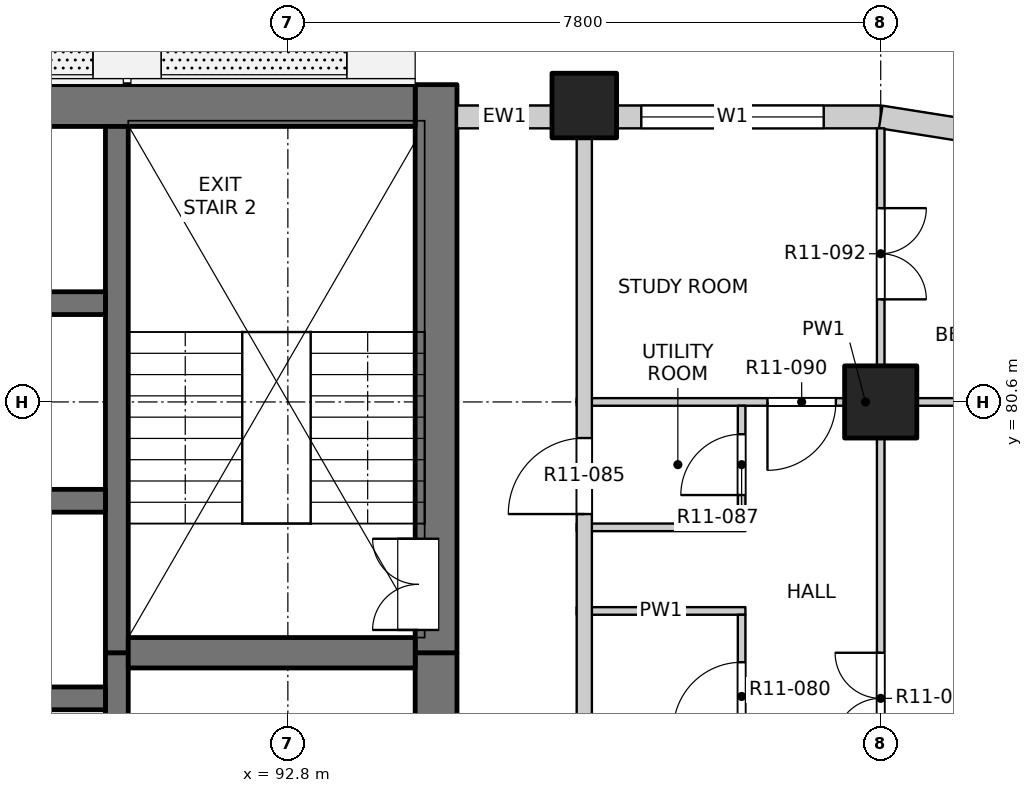
"""IFC4 building model, lengths in metres.
Left out: names, types, materials, properties, quantities, classifications, styles, units other than length and angle.
Written with IfcOpenShell. Run it as: python <this file> out.ifc"""

import sys

from ifc_helpers import new_model, si_unit, direction, frame, frame_2d, origin, origin_2d, place, context, subcontext, project, spatial, rectangle, extrude, element, fill, save


model = new_model("IFC4")
c1 = context("Model", 3, precision=1e-05, world=origin(), true_north=direction((0.0, 1.0)))
c2 = subcontext(c1, "Body", "Model", "MODEL_VIEW")
j1 = project(units=[si_unit("LENGTHUNIT", "METRE"), si_unit("PLANEANGLEUNIT", "RADIAN")], contexts=[c1])
p1 = place(None, origin())
s1 = spatial("IfcSite", under=j1, at=p1, CompositionType="ELEMENT")
p2 = place(p1, origin())
s2 = spatial("IfcBuilding", under=s1, at=p2, CompositionType="ELEMENT")
p3 = place(p2, frame((0.0, 0.0, 130.5)))
s3 = spatial("IfcBuildingStorey", under=s2, at=p3, CompositionType="ELEMENT", Elevation=130.5)
p4 = place(p3, frame((96.7, 84.5, -0.25), z_axis=(0.0, 0.0, 1.0), x_axis=(1.0, 0.0, 0.0)))
e1 = element("IfcColumn", 1, at=p4, inside=s3, PredefinedType="COLUMN", context=c2, shape_type="SweptSolid", body=[
    extrude(rectangle(XDim=0.85, YDim=0.85, at=origin_2d()), origin(), (0.0, 0.0, 1.0), 3.4),
])
p5 = place(p3, frame((100.6, 80.6, -0.25), z_axis=(0.0, 0.0, 1.0), x_axis=(1.0, 0.0, 0.0)))
e2 = element("IfcColumn", 2, at=p5, inside=s3, PredefinedType="COLUMN", context=c2, shape_type="SweptSolid", body=[
    extrude(rectangle(XDim=0.95, YDim=0.95, at=origin_2d()), origin(), (0.0, 0.0, 1.0), 3.4),
])
p6 = place(p3, frame((94.75, 61.95, -0.25), z_axis=(0.0, 0.0, 1.0), x_axis=(0.0, 1.0, 0.0)))
e3 = element("IfcWall", 3, at=p6, inside=s3, PredefinedType="SOLIDWALL", context=c2, shape_type="SweptSolid", body=[
    extrude(rectangle(XDim=15.35, YDim=0.55, at=frame_2d((7.675, 0.0))), origin(), (0.0, 0.0, 1.0), 3.4),
])
p7 = place(p6, frame((0.925, 0.0, 0.25)))
e4 = element("IfcOpeningElement", 4, at=p7, cuts=e3, PredefinedType="OPENING", context=c2, shape_type="SweptSolid", body=[
    extrude(rectangle(XDim=0.9, YDim=2.1, at=frame_2d((0.45, 1.05))), frame((0.0, 0.285, 0.0), z_axis=(0.0, -1.0, 0.0), x_axis=(1.0, 0.0, 0.0)), (0.0, 0.0, 1.0), 0.57),
])
p8 = place(p6, frame((3.8, 0.0, 0.25)))
e5 = element("IfcOpeningElement", 5, at=p8, cuts=e3, PredefinedType="OPENING", context=c2, shape_type="SweptSolid", body=[
    extrude(rectangle(XDim=0.9, YDim=2.1, at=frame_2d((0.45, 1.05))), frame((0.0, 0.285, 0.0), z_axis=(0.0, -1.0, 0.0), x_axis=(1.0, 0.0, 0.0)), (0.0, 0.0, 1.0), 0.57),
])
p9 = place(p6, frame((6.8, 0.0, 0.25)))
e6 = element("IfcOpeningElement", 6, at=p9, cuts=e3, PredefinedType="OPENING", context=c2, shape_type="SweptSolid", body=[
    extrude(rectangle(XDim=0.9, YDim=2.1, at=frame_2d((0.45, 1.05))), frame((0.0, 0.285, 0.0), z_axis=(0.0, -1.0, 0.0), x_axis=(1.0, 0.0, 0.0)), (0.0, 0.0, 1.0), 0.57),
])
p10 = place(p6, frame((9.8, 0.0, 0.25)))
e7 = element("IfcOpeningElement", 7, at=p10, cuts=e3, PredefinedType="OPENING", context=c2, shape_type="SweptSolid", body=[
    extrude(rectangle(XDim=0.9, YDim=2.1, at=frame_2d((0.45, 1.05))), frame((0.0, 0.285, 0.0), z_axis=(0.0, -1.0, 0.0), x_axis=(1.0, 0.0, 0.0)), (0.0, 0.0, 1.0), 0.57),
])
p11 = place(p6, frame((13.1, 0.0, 0.25)))
e8 = element("IfcOpeningElement", 8, at=p11, cuts=e3, PredefinedType="OPENING", context=c2, shape_type="SweptSolid", body=[
    extrude(rectangle(XDim=0.9, YDim=2.1, at=frame_2d((0.45, 1.05))), frame((0.0, 0.285, 0.0), z_axis=(0.0, -1.0, 0.0), x_axis=(1.0, 0.0, 0.0)), (0.0, 0.0, 1.0), 0.57),
])
p12 = place(p3, frame((94.75, 77.3, -0.25), z_axis=(0.0, 0.0, 1.0), x_axis=(0.0, 1.0, 0.0)))
e9 = element("IfcWall", 9, at=p12, inside=s3, PredefinedType="SOLIDWALL", context=c2, shape_type="SweptSolid", body=[
    extrude(rectangle(XDim=7.475, YDim=0.55, at=frame_2d((3.737, 0.0))), origin(), (0.0, 0.0, 1.0), 3.4),
])
p13 = place(p12, frame((0.3, 0.0, 0.25)))
e10 = element("IfcOpeningElement", 10, at=p13, cuts=e9, PredefinedType="OPENING", context=c2, shape_type="SweptSolid", body=[
    extrude(rectangle(XDim=1.2, YDim=2.1, at=frame_2d((0.6, 1.05))), frame((0.0, 0.285, 0.0), z_axis=(0.0, -1.0, 0.0), x_axis=(1.0, 0.0, 0.0)), (0.0, 0.0, 1.0), 0.57),
])
p14 = place(p3, frame((75.525, 84.5, -0.25), z_axis=(0.0, 0.0, 1.0), x_axis=(1.0, 0.0, 0.0)))
e11 = element("IfcWall", 11, at=p14, inside=s3, PredefinedType="SOLIDWALL", context=c2, shape_type="SweptSolid", body=[
    extrude(rectangle(XDim=18.95, YDim=0.55, at=frame_2d((9.475, 0.0))), origin(), (0.0, 0.0, 1.0), 3.4),
])
p15 = place(p3, frame((90.55, 61.95, -0.25), z_axis=(0.0, 0.0, 1.0), x_axis=(0.0, 1.0, 0.0)))
e12 = element("IfcWall", 12, at=p15, inside=s3, PredefinedType="SOLIDWALL", context=c2, shape_type="SweptSolid", body=[
    extrude(rectangle(XDim=15.35, YDim=0.3, at=frame_2d((7.675, 0.0))), origin(), (0.0, 0.0, 1.0), 3.4),
])
p16 = place(p3, frame((90.55, 77.3, -0.25), z_axis=(0.0, 0.0, 1.0), x_axis=(0.0, 1.0, 0.0)))
e13 = element("IfcWall", 13, at=p16, inside=s3, PredefinedType="SOLIDWALL", context=c2, shape_type="SweptSolid", body=[
    extrude(rectangle(XDim=6.925, YDim=0.3, at=frame_2d((3.462, 0.0))), origin(), (0.0, 0.0, 1.0), 3.4),
])
for number, where, z_axis, x_axis in (
    (14, (87.4, 76.7, -0.25), (0.0, 0.0, 1.0), (1.0, 0.0, 0.0)),
    (15, (87.4, 79.3, -0.25), (0.0, 0.0, 1.0), (1.0, 0.0, 0.0)),
    (16, (87.4, 81.9, -0.25), (0.0, 0.0, 1.0), (1.0, 0.0, 0.0)),
):
    element("IfcWall", number, at=place(p3, frame(where, z_axis=z_axis, x_axis=x_axis)), inside=s3, PredefinedType="SOLIDWALL", context=c2, shape_type="SweptSolid", body=[
        extrude(rectangle(XDim=3.0, YDim=0.3, at=frame_2d((1.5, 0.0))), origin(), (0.0, 0.0, 1.0), 3.4),
    ])
p17 = place(p3, frame((90.7, 77.3, -0.25), z_axis=(0.0, 0.0, 1.0), x_axis=(1.0, 0.0, 0.0)))
e17 = element("IfcWall", 17, at=p17, inside=s3, PredefinedType="SOLIDWALL", context=c2, shape_type="SweptSolid", body=[
    extrude(rectangle(XDim=3.775, YDim=0.4, at=frame_2d((1.888, 0.0))), origin(), (0.0, 0.0, 1.0), 3.4),
])
p18 = place(p3, frame((95.025, 84.35, 0.0), z_axis=(0.0, 0.0, 1.0), x_axis=(1.0, 0.0, 0.0)))
e18 = element("IfcWall", 18, at=p18, inside=s3, PredefinedType="SOLIDWALL", context=c2, shape_type="SweptSolid", body=[
    extrude(rectangle(XDim=1.25, YDim=0.3, at=frame_2d((0.625, 0.0))), origin(), (0.0, 0.0, 1.0), 2.7),
])
p19 = place(p3, frame((97.125, 84.35, 0.0), z_axis=(0.0, 0.0, 1.0), x_axis=(1.0, 0.0, 0.0)))
e19 = element("IfcWall", 19, at=p19, inside=s3, PredefinedType="SOLIDWALL", context=c2, shape_type="SweptSolid", body=[
    extrude(rectangle(XDim=3.475, YDim=0.3, at=frame_2d((1.738, 0.0))), origin(), (0.0, 0.0, 1.0), 2.7),
])
p20 = place(p19, frame((0.325, 0.0, 0.9)))
e20 = element("IfcOpeningElement", 20, at=p20, cuts=e19, PredefinedType="OPENING", context=c2, shape_type="SweptSolid", body=[
    extrude(rectangle(XDim=2.4, YDim=1.8, at=frame_2d((1.2, 0.9))), frame((0.0, 0.16, 0.0), z_axis=(0.0, -1.0, 0.0), x_axis=(1.0, 0.0, 0.0)), (0.0, 0.0, 1.0), 0.32),
])
p21 = place(p3, frame((101.759, 84.167, 0.0), z_axis=(0.0, 0.0, 1.0), x_axis=(-0.987678452879, 0.156496880861, 0.0)))
e21 = element("IfcWall", 21, at=p21, inside=s3, PredefinedType="SOLIDWALL", context=c2, shape_type="SweptSolid", body=[
    extrude(rectangle(XDim=1.173, YDim=0.3, at=frame_2d((0.586, 0.0))), origin(), (0.0, 0.0, 1.0), 2.7),
])
for number, where, z_axis, x_axis in (
    (22, (96.6, 77.85, 0.0), (0.0, 0.0, 1.0), (1.0, 0.0, 0.0)),
    (23, (96.6, 78.95, 0.0), (0.0, 0.0, 1.0), (1.0, 0.0, 0.0)),
):
    element("IfcWall", number, at=place(p3, frame(where, z_axis=z_axis, x_axis=x_axis)), inside=s3, PredefinedType="PARTITIONING", context=c2, shape_type="SweptSolid", body=[
        extrude(rectangle(XDim=2.22, YDim=0.1, at=frame_2d((1.11, 0.0))), origin(), (0.0, 0.0, 1.0), 3.15),
    ])
p22 = place(p3, frame((96.6, 80.6, 0.0), z_axis=(0.0, 0.0, 1.0), x_axis=(1.0, 0.0, 0.0)))
e24 = element("IfcWall", 24, at=p22, inside=s3, PredefinedType="PARTITIONING", context=c2, shape_type="SweptSolid", body=[
    extrude(rectangle(XDim=7.6, YDim=0.1, at=frame_2d((3.8, 0.0))), origin(), (0.0, 0.0, 1.0), 3.15),
])
p23 = place(p22, frame((2.51, 0.0, 0.0)))
e25 = element("IfcOpeningElement", 25, at=p23, cuts=e24, PredefinedType="OPENING", context=c2, shape_type="SweptSolid", body=[
    extrude(rectangle(XDim=0.9, YDim=2.1, at=frame_2d((0.45, 1.05))), frame((0.0, 0.06, 0.0), z_axis=(0.0, -1.0, 0.0), x_axis=(1.0, 0.0, 0.0)), (0.0, 0.0, 1.0), 0.12),
])
p24 = place(p3, frame((96.7, 53.4, 0.0), z_axis=(0.0, 0.0, 1.0), x_axis=(0.0, 1.0, 0.0)))
e26 = element("IfcWall", 26, at=p24, inside=s3, PredefinedType="PARTITIONING", context=c2, shape_type="SweptSolid", body=[
    extrude(rectangle(XDim=30.8, YDim=0.2, at=frame_2d((15.4, 0.0))), origin(), (0.0, 0.0, 1.0), 3.15),
])
p25 = place(p24, frame((1.875, 0.0, 0.0)))
e27 = element("IfcOpeningElement", 27, at=p25, cuts=e26, PredefinedType="OPENING", context=c2, shape_type="SweptSolid", body=[
    extrude(rectangle(XDim=1.0, YDim=2.1, at=frame_2d((0.5, 1.05))), frame((0.0, 0.11, 0.0), z_axis=(0.0, -1.0, 0.0), x_axis=(1.0, 0.0, 0.0)), (0.0, 0.0, 1.0), 0.22),
])
p26 = place(p24, frame((10.875, 0.0, 0.0)))
e28 = element("IfcOpeningElement", 28, at=p26, cuts=e26, PredefinedType="OPENING", context=c2, shape_type="SweptSolid", body=[
    extrude(rectangle(XDim=1.0, YDim=2.1, at=frame_2d((0.5, 1.05))), frame((0.0, 0.11, 0.0), z_axis=(0.0, -1.0, 0.0), x_axis=(1.0, 0.0, 0.0)), (0.0, 0.0, 1.0), 0.22),
])
p27 = place(p24, frame((25.725, 0.0, 0.0)))
e29 = element("IfcOpeningElement", 29, at=p27, cuts=e26, PredefinedType="OPENING", context=c2, shape_type="SweptSolid", body=[
    extrude(rectangle(XDim=1.0, YDim=2.1, at=frame_2d((0.5, 1.05))), frame((0.0, 0.11, 0.0), z_axis=(0.0, -1.0, 0.0), x_axis=(1.0, 0.0, 0.0)), (0.0, 0.0, 1.0), 0.22),
])
p28 = place(p3, frame((98.77, 64.15, 0.0), z_axis=(0.0, 0.0, 1.0), x_axis=(0.0, 1.0, 0.0)))
e30 = element("IfcWall", 30, at=p28, inside=s3, PredefinedType="PARTITIONING", context=c2, shape_type="SweptSolid", body=[
    extrude(rectangle(XDim=13.65, YDim=0.1, at=frame_2d((6.825, 0.0))), origin(), (0.0, 0.0, 1.0), 3.15),
])
p29 = place(p28, frame((0.75, 0.0, 0.0)))
e31 = element("IfcOpeningElement", 31, at=p29, cuts=e30, PredefinedType="OPENING", context=c2, shape_type="SweptSolid", body=[
    extrude(rectangle(XDim=0.8, YDim=2.1, at=frame_2d((0.4, 1.05))), frame((0.0, 0.06, 0.0), z_axis=(0.0, -1.0, 0.0), x_axis=(1.0, 0.0, 0.0)), (0.0, 0.0, 1.0), 0.12),
])
p30 = place(p28, frame((3.1, 0.0, 0.0)))
e32 = element("IfcOpeningElement", 32, at=p30, cuts=e30, PredefinedType="OPENING", context=c2, shape_type="SweptSolid", body=[
    extrude(rectangle(XDim=0.9, YDim=2.1, at=frame_2d((0.45, 1.05))), frame((0.0, 0.06, 0.0), z_axis=(0.0, -1.0, 0.0), x_axis=(1.0, 0.0, 0.0)), (0.0, 0.0, 1.0), 0.12),
])
p31 = place(p28, frame((5.61, 0.0, 0.0)))
e33 = element("IfcOpeningElement", 33, at=p31, cuts=e30, PredefinedType="OPENING", context=c2, shape_type="SweptSolid", body=[
    extrude(rectangle(XDim=0.9, YDim=2.1, at=frame_2d((0.45, 1.05))), frame((0.0, 0.06, 0.0), z_axis=(0.0, -1.0, 0.0), x_axis=(1.0, 0.0, 0.0)), (0.0, 0.0, 1.0), 0.12),
])
p32 = place(p28, frame((8.045, 0.0, 0.0)))
e34 = element("IfcOpeningElement", 34, at=p32, cuts=e30, PredefinedType="OPENING", context=c2, shape_type="SweptSolid", body=[
    extrude(rectangle(XDim=0.8, YDim=2.1, at=frame_2d((0.4, 1.05))), frame((0.0, 0.06, 0.0), z_axis=(0.0, -1.0, 0.0), x_axis=(1.0, 0.0, 0.0)), (0.0, 0.0, 1.0), 0.12),
])
p33 = place(p28, frame((10.035, 0.0, 0.0)))
e35 = element("IfcOpeningElement", 35, at=p33, cuts=e30, PredefinedType="OPENING", context=c2, shape_type="SweptSolid", body=[
    extrude(rectangle(XDim=0.9, YDim=2.1, at=frame_2d((0.45, 1.05))), frame((0.0, 0.06, 0.0), z_axis=(0.0, -1.0, 0.0), x_axis=(1.0, 0.0, 0.0)), (0.0, 0.0, 1.0), 0.12),
])
p34 = place(p28, frame((12.125, 0.0, 0.0)))
e36 = element("IfcOpeningElement", 36, at=p34, cuts=e30, PredefinedType="OPENING", context=c2, shape_type="SweptSolid", body=[
    extrude(rectangle(XDim=0.9, YDim=2.1, at=frame_2d((0.45, 1.05))), frame((0.0, 0.06, 0.0), z_axis=(0.0, -1.0, 0.0), x_axis=(1.0, 0.0, 0.0)), (0.0, 0.0, 1.0), 0.12),
])
p35 = place(p3, frame((98.77, 79.0, 0.0), z_axis=(0.0, 0.0, 1.0), x_axis=(0.0, 1.0, 0.0)))
e37 = element("IfcWall", 37, at=p35, inside=s3, PredefinedType="PARTITIONING", context=c2, shape_type="SweptSolid", body=[
    extrude(rectangle(XDim=1.55, YDim=0.1, at=frame_2d((0.775, 0.0))), origin(), (0.0, 0.0, 1.0), 3.15),
])
p36 = place(p35, frame((0.375, 0.0, 0.0)))
e38 = element("IfcOpeningElement", 38, at=p36, cuts=e37, PredefinedType="OPENING", context=c2, shape_type="SweptSolid", body=[
    extrude(rectangle(XDim=0.8, YDim=2.1, at=frame_2d((0.4, 1.05))), frame((0.0, 0.06, 0.0), z_axis=(0.0, -1.0, 0.0), x_axis=(1.0, 0.0, 0.0)), (0.0, 0.0, 1.0), 0.12),
])
p37 = place(p3, frame((100.6, 45.8, 0.0), z_axis=(0.0, 0.0, 1.0), x_axis=(0.0, 1.0, 0.0)))
e39 = element("IfcWall", 39, at=p37, inside=s3, PredefinedType="PARTITIONING", context=c2, shape_type="SweptSolid", body=[
    extrude(rectangle(XDim=38.4, YDim=0.1, at=frame_2d((19.2, 0.0))), origin(), (0.0, 0.0, 1.0), 3.15),
])
p38 = place(p37, frame((1.05, 0.0, 0.0)))
e40 = element("IfcOpeningElement", 40, at=p38, cuts=e39, PredefinedType="OPENING", context=c2, shape_type="SweptSolid", body=[
    extrude(rectangle(XDim=1.2, YDim=2.1, at=frame_2d((0.6, 1.05))), frame((0.0, 0.06, 0.0), z_axis=(0.0, -1.0, 0.0), x_axis=(1.0, 0.0, 0.0)), (0.0, 0.0, 1.0), 0.12),
])
p39 = place(p37, frame((5.1, 0.0, 0.0)))
e41 = element("IfcOpeningElement", 41, at=p39, cuts=e39, PredefinedType="OPENING", context=c2, shape_type="SweptSolid", body=[
    extrude(rectangle(XDim=0.9, YDim=2.1, at=frame_2d((0.45, 1.05))), frame((0.0, 0.06, 0.0), z_axis=(0.0, -1.0, 0.0), x_axis=(1.0, 0.0, 0.0)), (0.0, 0.0, 1.0), 0.12),
])
p40 = place(p37, frame((9.0, 0.0, 0.0)))
e42 = element("IfcOpeningElement", 42, at=p40, cuts=e39, PredefinedType="OPENING", context=c2, shape_type="SweptSolid", body=[
    extrude(rectangle(XDim=0.9, YDim=2.1, at=frame_2d((0.45, 1.05))), frame((0.0, 0.06, 0.0), z_axis=(0.0, -1.0, 0.0), x_axis=(1.0, 0.0, 0.0)), (0.0, 0.0, 1.0), 0.12),
])
p41 = place(p37, frame((12.9, 0.0, 0.0)))
e43 = element("IfcOpeningElement", 43, at=p41, cuts=e39, PredefinedType="OPENING", context=c2, shape_type="SweptSolid", body=[
    extrude(rectangle(XDim=0.9, YDim=2.1, at=frame_2d((0.45, 1.05))), frame((0.0, 0.06, 0.0), z_axis=(0.0, -1.0, 0.0), x_axis=(1.0, 0.0, 0.0)), (0.0, 0.0, 1.0), 0.12),
])
p42 = place(p37, frame((16.8, 0.0, 0.0)))
e44 = element("IfcOpeningElement", 44, at=p42, cuts=e39, PredefinedType="OPENING", context=c2, shape_type="SweptSolid", body=[
    extrude(rectangle(XDim=0.9, YDim=2.1, at=frame_2d((0.45, 1.05))), frame((0.0, 0.06, 0.0), z_axis=(0.0, -1.0, 0.0), x_axis=(1.0, 0.0, 0.0)), (0.0, 0.0, 1.0), 0.12),
])
p43 = place(p37, frame((20.7, 0.0, 0.0)))
e45 = element("IfcOpeningElement", 45, at=p43, cuts=e39, PredefinedType="OPENING", context=c2, shape_type="SweptSolid", body=[
    extrude(rectangle(XDim=0.9, YDim=2.1, at=frame_2d((0.45, 1.05))), frame((0.0, 0.06, 0.0), z_axis=(0.0, -1.0, 0.0), x_axis=(1.0, 0.0, 0.0)), (0.0, 0.0, 1.0), 0.12),
])
p44 = place(p37, frame((24.6, 0.0, 0.0)))
e46 = element("IfcOpeningElement", 46, at=p44, cuts=e39, PredefinedType="OPENING", context=c2, shape_type="SweptSolid", body=[
    extrude(rectangle(XDim=0.9, YDim=2.1, at=frame_2d((0.45, 1.05))), frame((0.0, 0.06, 0.0), z_axis=(0.0, -1.0, 0.0), x_axis=(1.0, 0.0, 0.0)), (0.0, 0.0, 1.0), 0.12),
])
p45 = place(p37, frame((30.3, 0.0, 0.0)))
e47 = element("IfcOpeningElement", 47, at=p45, cuts=e39, PredefinedType="OPENING", context=c2, shape_type="SweptSolid", body=[
    extrude(rectangle(XDim=1.2, YDim=2.1, at=frame_2d((0.6, 1.05))), frame((0.0, 0.06, 0.0), z_axis=(0.0, -1.0, 0.0), x_axis=(1.0, 0.0, 0.0)), (0.0, 0.0, 1.0), 0.12),
])
p46 = place(p37, frame((36.15, 0.0, 0.0)))
e48 = element("IfcOpeningElement", 48, at=p46, cuts=e39, PredefinedType="OPENING", context=c2, shape_type="SweptSolid", body=[
    extrude(rectangle(XDim=1.2, YDim=2.1, at=frame_2d((0.6, 1.05))), frame((0.0, 0.06, 0.0), z_axis=(0.0, -1.0, 0.0), x_axis=(1.0, 0.0, 0.0)), (0.0, 0.0, 1.0), 0.12),
])
p47 = place(p20, origin())
e49 = element("IfcWindow", 49, at=p47, inside=s3, PartitioningType="DOUBLE_PANEL_VERTICAL", PredefinedType="WINDOW", context=c2, shape_type="SweptSolid", body=[
    extrude(rectangle(XDim=2.4, YDim=1.8, at=frame_2d((1.2, 0.9))), frame((0.0, 0.03, 0.0), z_axis=(0.0, -1.0, 0.0), x_axis=(1.0, 0.0, 0.0)), (0.0, 0.0, 1.0), 0.06),
])
fill(e20, e49)
p48 = place(p45, origin())
e50 = element("IfcDoor", 50, at=p48, inside=s3, OperationType="DOUBLE_DOOR_SINGLE_SWING", PredefinedType="DOOR", context=c2, shape_type="SweptSolid", body=[
    extrude(rectangle(XDim=1.2, YDim=2.1, at=frame_2d((0.6, 1.05))), frame((0.0, 0.025, 0.0), z_axis=(0.0, -1.0, 0.0), x_axis=(1.0, 0.0, 0.0)), (0.0, 0.0, 1.0), 0.05),
])
fill(e47, e50)
p49 = place(p34, origin())
e51 = element("IfcDoor", 51, at=p49, inside=s3, OperationType="SINGLE_SWING_LEFT", PredefinedType="DOOR", context=c2, shape_type="SweptSolid", body=[
    extrude(rectangle(XDim=0.9, YDim=2.1, at=frame_2d((0.45, 1.05))), frame((0.0, 0.025, 0.0), z_axis=(0.0, -1.0, 0.0), x_axis=(1.0, 0.0, 0.0)), (0.0, 0.0, 1.0), 0.05),
])
fill(e36, e51)
p50 = place(p13, origin())
e52 = element("IfcDoor", 52, at=p50, inside=s3, OperationType="DOUBLE_DOOR_SINGLE_SWING", PredefinedType="DOOR", context=c2, shape_type="SweptSolid", body=[
    extrude(rectangle(XDim=1.2, YDim=2.1, at=frame_2d((0.6, 1.05))), frame((0.0, 0.26, 0.0), z_axis=(0.0, -1.0, 0.0), x_axis=(1.0, 0.0, 0.0)), (0.0, 0.0, 1.0), 0.05),
])
fill(e10, e52)
p51 = place(p27, origin())
e53 = element("IfcDoor", 53, at=p51, inside=s3, OperationType="SINGLE_SWING_LEFT", PredefinedType="DOOR", context=c2, shape_type="SweptSolid", body=[
    extrude(rectangle(XDim=1.0, YDim=2.1, at=frame_2d((0.5, 1.05))), frame((0.0, 0.025, 0.0), z_axis=(0.0, -1.0, 0.0), x_axis=(1.0, 0.0, 0.0)), (0.0, 0.0, 1.0), 0.05),
])
fill(e29, e53)
p52 = place(p36, origin())
e54 = element("IfcDoor", 54, at=p52, inside=s3, OperationType="SINGLE_SWING_LEFT", PredefinedType="DOOR", context=c2, shape_type="SweptSolid", body=[
    extrude(rectangle(XDim=0.8, YDim=2.1, at=frame_2d((0.4, 1.05))), frame((0.0, 0.025, 0.0), z_axis=(0.0, -1.0, 0.0), x_axis=(1.0, 0.0, 0.0)), (0.0, 0.0, 1.0), 0.05),
])
fill(e38, e54)
p53 = place(p23, origin())
e55 = element("IfcDoor", 55, at=p53, inside=s3, OperationType="SINGLE_SWING_RIGHT", PredefinedType="DOOR", context=c2, shape_type="SweptSolid", body=[
    extrude(rectangle(XDim=0.9, YDim=2.1, at=frame_2d((0.45, 1.05))), frame((0.0, 0.025, 0.0), z_axis=(0.0, -1.0, 0.0), x_axis=(1.0, 0.0, 0.0)), (0.0, 0.0, 1.0), 0.05),
])
fill(e25, e55)
p54 = place(p46, origin())
e56 = element("IfcDoor", 56, at=p54, inside=s3, OperationType="DOUBLE_DOOR_SINGLE_SWING", PredefinedType="DOOR", context=c2, shape_type="SweptSolid", body=[
    extrude(rectangle(XDim=1.2, YDim=2.1, at=frame_2d((0.6, 1.05))), frame((0.0, 0.025, 0.0), z_axis=(0.0, -1.0, 0.0), x_axis=(1.0, 0.0, 0.0)), (0.0, 0.0, 1.0), 0.05),
])
fill(e48, e56)
save(model, sys.argv[1])
